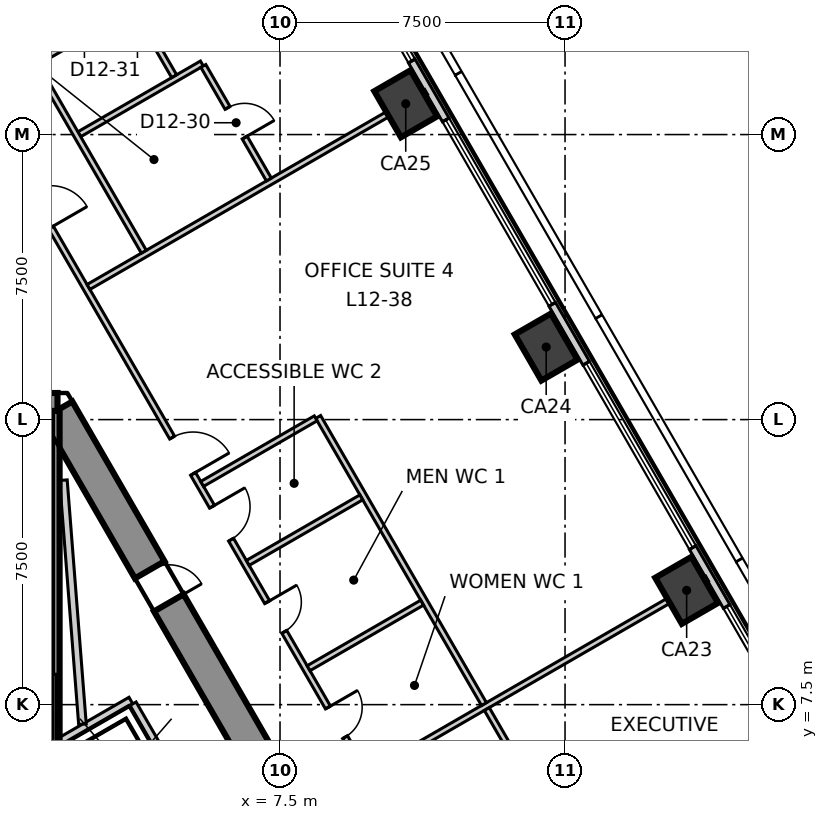
"""IFC4 building model, lengths in metres.
Left out: names, types, materials, properties, quantities, classifications, styles, units other than length and angle.
Written with IfcOpenShell. Run it as: python <this file> out.ifc"""

import sys

from ifc_helpers import new_model, si_unit, direction, frame, frame_2d, origin, origin_2d, place, context, subcontext, project, spatial, polyline, rectangle, outline, extrude, element, fill, save


model = new_model("IFC4")
c1 = context("Model", 3, precision=1e-05, world=origin(), true_north=direction((0.0, 1.0)))
c2 = subcontext(c1, "Body", "Model", "MODEL_VIEW")
j1 = project(units=[si_unit("LENGTHUNIT", "METRE"), si_unit("PLANEANGLEUNIT", "RADIAN")], contexts=[c1])
p1 = place(None, origin())
s1 = spatial("IfcSite", under=j1, at=p1, CompositionType="ELEMENT")
p2 = place(p1, origin())
s2 = spatial("IfcBuilding", under=s1, at=p2, CompositionType="ELEMENT")
p3 = place(p2, frame((0.0, 0.0, 59.3)))
s3 = spatial("IfcBuildingStorey", under=s2, at=p3, CompositionType="ELEMENT", Elevation=59.3)
p4 = place(p3, frame((1.645, 15.25, -0.3), z_axis=(0.0, 0.0, 1.0), x_axis=(-1.0, 0.0, 0.0)))
e1 = element("IfcWall", 1, at=p4, inside=s3, PredefinedType="SHEAR", context=c2, shape_type="SweptSolid", body=[
    extrude(outline(polyline([(-0.26, -0.45), (1.645, -0.45), (3.55, -0.45), (3.031, 0.45), (1.645, 0.45), (0.259, 0.45), (-0.26, -0.45)])), origin(), (0.0, 0.0, 1.0), 4.0),
])
p5 = place(p4, frame((0.945, 0.0, 0.3)))
e2 = element("IfcOpeningElement", 2, at=p5, cuts=e1, PredefinedType="OPENING", context=c2, shape_type="SweptSolid", body=[
    extrude(rectangle(XDim=1.4, YDim=2.1, at=frame_2d((0.7, 1.05))), frame((0.0, 0.46, 0.0), z_axis=(0.0, -1.0, 0.0), x_axis=(1.0, 0.0, 0.0)), (0.0, 0.0, 1.0), 0.92),
])
p6 = place(p3, frame((14.03, -6.2, -0.3), z_axis=(0.0, 0.0, 1.0), x_axis=(-0.500026485275, 0.866010111964, 0.0)))
e3 = element("IfcWall", 3, at=p6, inside=s3, PredefinedType="SHEAR", context=c2, shape_type="SweptSolid", body=[
    extrude(outline(polyline([(-0.26, -0.449), (1.685, -0.449), (3.63, -0.449), (5.576, -0.449), (7.521, -0.449), (9.466, -0.449), (11.411, -0.449), (13.357, -0.449), (15.302, -0.449), (17.247, -0.45), (19.192, -0.45), (21.138, -0.45), (23.083, -0.45), (25.028, -0.45), (24.509, 0.449), (22.644, 0.449), (20.778, 0.449), (18.913, 0.449), (17.048, 0.449), (15.182, 0.449), (13.317, 0.449), (11.452, 0.449), (9.587, 0.449), (7.721, 0.45), (5.856, 0.45), (3.991, 0.45), (2.125, 0.45), (0.26, 0.45), (-0.26, -0.449)])), origin(), (0.0, 0.0, 1.0), 4.0),
])
p7 = place(p6, frame((11.484, 0.0, 0.3)))
e4 = element("IfcOpeningElement", 4, at=p7, cuts=e3, PredefinedType="OPENING", context=c2, shape_type="SweptSolid", body=[
    extrude(rectangle(XDim=1.8, YDim=2.1, at=frame_2d((0.9, 1.05))), frame((0.0, 0.46, 0.0), z_axis=(0.0, -1.0, 0.0), x_axis=(1.0, 0.0, 0.0)), (0.0, 0.0, 1.0), 0.92),
])
p8 = place(p6, frame((18.914, 0.0, 0.3)))
e5 = element("IfcOpeningElement", 5, at=p8, cuts=e3, PredefinedType="OPENING", context=c2, shape_type="SweptSolid", body=[
    extrude(rectangle(XDim=1.0, YDim=2.1, at=frame_2d((0.5, 1.05))), frame((0.0, 0.46, 0.0), z_axis=(0.0, -1.0, 0.0), x_axis=(1.0, 0.0, 0.0)), (0.0, 0.0, 1.0), 0.92),
])
for number, where, z_axis, x_axis in (
    (6, (18.2, 10.507, -0.3), (0.0, 0.0, 1.0), (-0.5, 0.866, 0.0)),
    (7, (14.504, 16.909, -0.3), (0.0, 0.0, 1.0), (-0.5, 0.866, 0.0)),
    (8, (10.808, 23.31, -0.3), (0.0, 0.0, 1.0), (-0.5, 0.866, 0.0)),
):
    element("IfcColumn", number, at=place(p3, frame(where, z_axis=z_axis, x_axis=x_axis)), inside=s3, PredefinedType="COLUMN", context=c2, shape_type="SweptSolid", body=[
        extrude(rectangle(XDim=1.4, YDim=1.1, at=origin_2d()), origin(), (0.0, 0.0, 1.0), 4.0),
    ])
p9 = place(p3, frame((34.241, -15.876, 0.0), z_axis=(0.0, 0.0, 1.0), x_axis=(-0.500006313899, 0.866021758423, 0.0)))
e9 = element("IfcWall", 9, at=p9, inside=s3, PredefinedType="ELEMENTEDWALL", context=c2, shape_type="SweptSolid", body=[
    extrude(rectangle(XDim=61.719, YDim=0.2, at=frame_2d((30.859, 0.0))), origin(), (0.0, 0.0, 1.0), 3.7),
])
p10 = place(p9, frame((2.199, 0.0, 0.9)))
e10 = element("IfcOpeningElement", 10, at=p10, cuts=e9, PredefinedType="OPENING", context=c2, shape_type="SweptSolid", body=[
    extrude(rectangle(XDim=5.6, YDim=2.5, at=frame_2d((2.8, 1.25))), frame((0.0, 0.11, 0.0), z_axis=(0.0, -1.0, 0.0), x_axis=(1.0, 0.0, 0.0)), (0.0, 0.0, 1.0), 0.22),
])
p11 = place(p9, frame((9.59, 0.0, 0.9)))
e11 = element("IfcOpeningElement", 11, at=p11, cuts=e9, PredefinedType="OPENING", context=c2, shape_type="SweptSolid", body=[
    extrude(rectangle(XDim=5.6, YDim=2.5, at=frame_2d((2.8, 1.25))), frame((0.0, 0.11, 0.0), z_axis=(0.0, -1.0, 0.0), x_axis=(1.0, 0.0, 0.0)), (0.0, 0.0, 1.0), 0.22),
])
p12 = place(p9, frame((16.982, 0.0, 0.9)))
e12 = element("IfcOpeningElement", 12, at=p12, cuts=e9, PredefinedType="OPENING", context=c2, shape_type="SweptSolid", body=[
    extrude(rectangle(XDim=5.6, YDim=2.5, at=frame_2d((2.8, 1.25))), frame((0.0, 0.11, 0.0), z_axis=(0.0, -1.0, 0.0), x_axis=(1.0, 0.0, 0.0)), (0.0, 0.0, 1.0), 0.22),
])
p13 = place(p9, frame((24.374, 0.0, 0.9)))
e13 = element("IfcOpeningElement", 13, at=p13, cuts=e9, PredefinedType="OPENING", context=c2, shape_type="SweptSolid", body=[
    extrude(rectangle(XDim=5.6, YDim=2.5, at=frame_2d((2.8, 1.25))), frame((0.0, 0.11, 0.0), z_axis=(0.0, -1.0, 0.0), x_axis=(1.0, 0.0, 0.0)), (0.0, 0.0, 1.0), 0.22),
])
p14 = place(p9, frame((31.765, 0.0, 0.9)))
e14 = element("IfcOpeningElement", 14, at=p14, cuts=e9, PredefinedType="OPENING", context=c2, shape_type="SweptSolid", body=[
    extrude(rectangle(XDim=5.6, YDim=2.5, at=frame_2d((2.8, 1.25))), frame((0.0, 0.11, 0.0), z_axis=(0.0, -1.0, 0.0), x_axis=(1.0, 0.0, 0.0)), (0.0, 0.0, 1.0), 0.22),
])
p15 = place(p9, frame((39.157, 0.0, 0.9)))
e15 = element("IfcOpeningElement", 15, at=p15, cuts=e9, PredefinedType="OPENING", context=c2, shape_type="SweptSolid", body=[
    extrude(rectangle(XDim=5.6, YDim=2.5, at=frame_2d((2.8, 1.25))), frame((0.0, 0.11, 0.0), z_axis=(0.0, -1.0, 0.0), x_axis=(1.0, 0.0, 0.0)), (0.0, 0.0, 1.0), 0.22),
])
p16 = place(p9, frame((46.549, 0.0, 0.9)))
e16 = element("IfcOpeningElement", 16, at=p16, cuts=e9, PredefinedType="OPENING", context=c2, shape_type="SweptSolid", body=[
    extrude(rectangle(XDim=5.6, YDim=2.5, at=frame_2d((2.8, 1.25))), frame((0.0, 0.11, 0.0), z_axis=(0.0, -1.0, 0.0), x_axis=(1.0, 0.0, 0.0)), (0.0, 0.0, 1.0), 0.22),
])
p17 = place(p9, frame((53.94, 0.0, 0.9)))
e17 = element("IfcOpeningElement", 17, at=p17, cuts=e9, PredefinedType="OPENING", context=c2, shape_type="SweptSolid", body=[
    extrude(rectangle(XDim=5.6, YDim=2.5, at=frame_2d((2.8, 1.25))), frame((0.0, 0.11, 0.0), z_axis=(0.0, -1.0, 0.0), x_axis=(1.0, 0.0, 0.0)), (0.0, 0.0, 1.0), 0.22),
])
p18 = place(p3, frame((9.851, 5.687, 0.0), z_axis=(0.0, 0.0, 1.0), x_axis=(0.865968814955, 0.500098001921, 0.0)))
e18 = element("IfcWall", 18, at=p18, inside=s3, PredefinedType="PARTITIONING", context=c2, shape_type="SweptSolid", body=[
    extrude(rectangle(XDim=10.26, YDim=0.15, at=frame_2d((5.13, 0.0))), origin(), (0.0, 0.0, 1.0), 3.2),
])
p19 = place(p3, frame((0.075, 22.47, 0.0), z_axis=(0.0, 0.0, 1.0), x_axis=(0.500002280369, -0.866024087209, 0.0)))
e19 = element("IfcWall", 19, at=p19, inside=s3, PredefinedType="PARTITIONING", context=c2, shape_type="SweptSolid", body=[
    extrude(rectangle(XDim=38.844, YDim=0.15, at=frame_2d((19.422, 0.0))), origin(), (0.0, 0.0, 1.0), 3.7),
])
p20 = place(p19, frame((36.044, 0.0, 0.0)))
e20 = element("IfcOpeningElement", 20, at=p20, cuts=e19, PredefinedType="OPENING", context=c2, shape_type="SweptSolid", body=[
    extrude(rectangle(XDim=1.1, YDim=2.1, at=frame_2d((0.55, 1.05))), frame((0.0, 0.085, 0.0), z_axis=(0.0, -1.0, 0.0), x_axis=(1.0, 0.0, 0.0)), (0.0, 0.0, 1.0), 0.17),
])
p21 = place(p19, frame((26.255, 0.0, 0.0)))
e21 = element("IfcOpeningElement", 21, at=p21, cuts=e19, PredefinedType="OPENING", context=c2, shape_type="SweptSolid", body=[
    extrude(rectangle(XDim=1.1, YDim=2.1, at=frame_2d((0.55, 1.05))), frame((0.0, 0.085, 0.0), z_axis=(0.0, -1.0, 0.0), x_axis=(1.0, 0.0, 0.0)), (0.0, 0.0, 1.0), 0.17),
])
p22 = place(p19, frame((9.173, 0.0, 0.0)))
e22 = element("IfcOpeningElement", 22, at=p22, cuts=e19, PredefinedType="OPENING", context=c2, shape_type="SweptSolid", body=[
    extrude(rectangle(XDim=1.1, YDim=2.1, at=frame_2d((0.55, 1.05))), frame((0.0, 0.085, 0.0), z_axis=(0.0, -1.0, 0.0), x_axis=(1.0, 0.0, 0.0)), (0.0, 0.0, 1.0), 0.17),
])
p23 = place(p19, frame((17.373, 0.0, 0.0)))
e23 = element("IfcOpeningElement", 23, at=p23, cuts=e19, PredefinedType="OPENING", context=c2, shape_type="SweptSolid", body=[
    extrude(rectangle(XDim=0.9, YDim=2.1, at=frame_2d((0.45, 1.05))), frame((0.0, 0.085, 0.0), z_axis=(0.0, -1.0, 0.0), x_axis=(1.0, 0.0, 0.0)), (0.0, 0.0, 1.0), 0.17),
])
p24 = place(p19, frame((14.173, 0.0, 0.0)))
e24 = element("IfcOpeningElement", 24, at=p24, cuts=e19, PredefinedType="OPENING", context=c2, shape_type="SweptSolid", body=[
    extrude(rectangle(XDim=0.9, YDim=2.1, at=frame_2d((0.45, 1.05))), frame((0.0, 0.085, 0.0), z_axis=(0.0, -1.0, 0.0), x_axis=(1.0, 0.0, 0.0)), (0.0, 0.0, 1.0), 0.17),
])
p25 = place(p19, frame((11.273, 0.0, 0.0)))
e25 = element("IfcOpeningElement", 25, at=p25, cuts=e19, PredefinedType="OPENING", context=c2, shape_type="SweptSolid", body=[
    extrude(rectangle(XDim=1.0, YDim=2.1, at=frame_2d((0.5, 1.05))), frame((0.0, 0.085, 0.0), z_axis=(0.0, -1.0, 0.0), x_axis=(1.0, 0.0, 0.0)), (0.0, 0.0, 1.0), 0.17),
])
p26 = place(p19, frame((1.689, 0.0, 0.0)))
e26 = element("IfcOpeningElement", 26, at=p26, cuts=e19, PredefinedType="OPENING", context=c2, shape_type="SweptSolid", body=[
    extrude(rectangle(XDim=1.1, YDim=2.1, at=frame_2d((0.55, 1.05))), frame((0.0, 0.085, 0.0), z_axis=(0.0, -1.0, 0.0), x_axis=(1.0, 0.0, 0.0)), (0.0, 0.0, 1.0), 0.17),
])
p27 = place(p3, frame((2.46, 18.49, 0.0), z_axis=(0.0, 0.0, 1.0), x_axis=(0.866010033384, 0.500026621369, 0.0)))
e27 = element("IfcWall", 27, at=p27, inside=s3, PredefinedType="PARTITIONING", context=c2, shape_type="SweptSolid", body=[
    extrude(rectangle(XDim=10.26, YDim=0.15, at=frame_2d((5.13, 0.0))), origin(), (0.0, 0.0, 1.0), 3.7),
])
p28 = place(p3, frame((8.504, 15.07, 0.0), z_axis=(0.0, 0.0, 1.0), x_axis=(0.500042162787, -0.86600105972, 0.0)))
e28 = element("IfcWall", 28, at=p28, inside=s3, PredefinedType="PARTITIONING", context=c2, shape_type="SweptSolid", body=[
    extrude(rectangle(XDim=8.725, YDim=0.15, at=frame_2d((4.363, 0.0))), origin(), (0.0, 0.0, 1.0), 3.7),
])
for number, where, z_axis, x_axis in (
    (29, (5.451, 13.308, 0.0), (0.0, 0.0, 1.0), (0.866, 0.5, 0.0)),
    (30, (6.651, 11.229, 0.0), (0.0, 0.0, 1.0), (0.866, 0.5, 0.0)),
    (31, (8.251, 8.458, 0.0), (0.0, 0.0, 1.0), (0.866, 0.5, 0.0)),
):
    element("IfcWall", number, at=place(p3, frame(where, z_axis=z_axis, x_axis=x_axis)), inside=s3, PredefinedType="PARTITIONING", context=c2, shape_type="SweptSolid", body=[
        extrude(rectangle(XDim=3.45, YDim=0.15, at=frame_2d((1.725, 0.0))), origin(), (0.0, 0.0, 1.0), 3.7),
    ])
p29 = place(p3, frame((2.218, 22.508, 0.0), z_axis=(0.0, 0.0, 1.0), x_axis=(0.866085180849, 0.499896448792, 0.0)))
e32 = element("IfcWall", 32, at=p29, inside=s3, PredefinedType="PARTITIONING", context=c2, shape_type="SweptSolid", body=[
    extrude(rectangle(XDim=3.725, YDim=0.15, at=frame_2d((1.862, 0.0))), origin(), (0.0, 0.0, 1.0), 3.7),
])
p30 = place(p3, frame((3.651, 25.875, 0.0), z_axis=(0.0, 0.0, 1.0), x_axis=(0.500302479123, -0.865850696935, 0.0)))
e33 = element("IfcWall", 33, at=p30, inside=s3, PredefinedType="PARTITIONING", context=c2, shape_type="SweptSolid", body=[
    extrude(rectangle(XDim=2.125, YDim=0.15, at=frame_2d((1.062, 0.0))), origin(), (0.0, 0.0, 1.0), 3.7),
])
p31 = place(p3, frame((1.053, 24.375, 0.0), z_axis=(0.0, 0.0, 1.0), x_axis=(0.866036909293, 0.499980071345, 0.0)))
e34 = element("IfcWall", 34, at=p31, inside=s3, PredefinedType="PARTITIONING", context=c2, shape_type="SweptSolid", body=[
    extrude(rectangle(XDim=2.926, YDim=0.15, at=frame_2d((1.463, 0.0))), origin(), (0.0, 0.0, 1.0), 3.7),
])
p32 = place(p31, frame((1.051, 0.0, 0.0)))
e35 = element("IfcOpeningElement", 35, at=p32, cuts=e34, PredefinedType="OPENING", context=c2, shape_type="SweptSolid", body=[
    extrude(rectangle(XDim=0.9, YDim=2.1, at=frame_2d((0.45, 1.05))), frame((0.0, 0.085, 0.0), z_axis=(0.0, -1.0, 0.0), x_axis=(1.0, 0.0, 0.0)), (0.0, 0.0, 1.0), 0.17),
])
p33 = place(p3, frame((1.091, 24.31, 0.0), z_axis=(0.0, 0.0, 1.0), x_axis=(0.499991765245, -0.86603015807, 0.0)))
e36 = element("IfcWall", 36, at=p33, inside=s3, PredefinedType="PARTITIONING", context=c2, shape_type="SweptSolid", body=[
    extrude(rectangle(XDim=5.65, YDim=0.15, at=frame_2d((2.825, 0.0))), origin(), (0.0, 0.0, 1.0), 3.7),
])
p34 = place(p3, frame((5.482, 24.305, 0.0), z_axis=(0.0, 0.0, 1.0), x_axis=(0.49998991961, -0.866031223622, 0.0)))
e37 = element("IfcWall", 37, at=p34, inside=s3, PredefinedType="PARTITIONING", context=c2, shape_type="SweptSolid", body=[
    extrude(rectangle(XDim=3.45, YDim=0.15, at=frame_2d((1.725, 0.0))), origin(), (0.0, 0.0, 1.0), 3.7),
])
p35 = place(p34, frame((1.275, 0.0, 0.0)))
e38 = element("IfcOpeningElement", 38, at=p35, cuts=e37, PredefinedType="OPENING", context=c2, shape_type="SweptSolid", body=[
    extrude(rectangle(XDim=0.9, YDim=2.1, at=frame_2d((0.45, 1.05))), frame((0.0, 0.085, 0.0), z_axis=(0.0, -1.0, 0.0), x_axis=(1.0, 0.0, 0.0)), (0.0, 0.0, 1.0), 0.17),
])
p36 = place(p3, frame((12.942, 7.384, 0.0), z_axis=(0.0, 0.0, 1.0), x_axis=(0.499995423472, -0.866028046028, 0.0)))
e39 = element("IfcWall", 39, at=p36, inside=s3, PredefinedType="PARTITIONING", context=c2, shape_type="SweptSolid", body=[
    extrude(rectangle(XDim=14.633, YDim=0.15, at=frame_2d((7.316, 0.0))), origin(), (0.0, 0.0, 1.0), 3.7),
])
p37 = place(p36, frame((6.857, 0.0, 0.0)))
e40 = element("IfcOpeningElement", 40, at=p37, cuts=e39, PredefinedType="OPENING", context=c2, shape_type="SweptSolid", body=[
    extrude(rectangle(XDim=1.0, YDim=2.1, at=frame_2d((0.5, 1.05))), frame((0.0, 0.085, 0.0), z_axis=(0.0, -1.0, 0.0), x_axis=(1.0, 0.0, 0.0)), (0.0, 0.0, 1.0), 0.17),
])
p38 = place(p3, frame((-0.002, 5.541, 0.0), z_axis=(0.0, 0.0, 1.0), x_axis=(0.86600155993, 0.500041296494, 0.0)))
e41 = element("IfcWall", 41, at=p38, inside=s3, PredefinedType="SOLIDWALL", context=c2, shape_type="SweptSolid", body=[
    extrude(rectangle(XDim=4.132, YDim=0.2, at=frame_2d((2.066, 0.0))), origin(), (0.0, 0.0, 1.0), 3.7),
])
p39 = place(p3, frame((3.626, 7.52, 0.0), z_axis=(0.0, 0.0, 1.0), x_axis=(0.500060147554, -0.865990674793, 0.0)))
e42 = element("IfcWall", 42, at=p39, inside=s3, PredefinedType="SOLIDWALL", context=c2, shape_type="SweptSolid", body=[
    extrude(rectangle(XDim=2.9, YDim=0.2, at=frame_2d((1.45, 0.0))), origin(), (0.0, 0.0, 1.0), 3.7),
])
p40 = place(p3, frame((1.8, 13.406, 0.0), z_axis=(0.0, 0.0, 1.0), x_axis=(0.077809933421, -0.996968211259, 0.0)))
e43 = element("IfcWall", 43, at=p40, inside=s3, PredefinedType="SOLIDWALL", context=c2, shape_type="SweptSolid", body=[
    extrude(rectangle(XDim=6.438, YDim=0.2, at=frame_2d((3.219, 0.0))), origin(), (0.0, 0.0, 1.0), 3.7),
])
p41 = place(p3, frame((1.6, 6.615, 0.0), z_axis=(0.0, 0.0, 1.0), x_axis=(0.0, 1.0, 0.0)))
e44 = element("IfcWall", 44, at=p41, inside=s3, PredefinedType="SOLIDWALL", context=c2, shape_type="SweptSolid", body=[
    extrude(rectangle(XDim=8.615, YDim=0.2, at=frame_2d((4.308, 0.0))), origin(), (0.0, 0.0, 1.0), 3.7),
])
p42 = place(p13, origin())
e45 = element("IfcWindow", 45, at=p42, inside=s3, PartitioningType="SINGLE_PANEL", PredefinedType="WINDOW", context=c2, shape_type="SweptSolid", body=[
    extrude(rectangle(XDim=5.6, YDim=2.5, at=frame_2d((2.8, 1.25))), frame((0.0, 0.03, 0.0), z_axis=(0.0, -1.0, 0.0), x_axis=(1.0, 0.0, 0.0)), (0.0, 0.0, 1.0), 0.06),
])
fill(e13, e45)
p43 = place(p14, origin())
e46 = element("IfcWindow", 46, at=p43, inside=s3, PartitioningType="SINGLE_PANEL", PredefinedType="WINDOW", context=c2, shape_type="SweptSolid", body=[
    extrude(rectangle(XDim=5.6, YDim=2.5, at=frame_2d((2.8, 1.25))), frame((0.0, 0.03, 0.0), z_axis=(0.0, -1.0, 0.0), x_axis=(1.0, 0.0, 0.0)), (0.0, 0.0, 1.0), 0.06),
])
fill(e14, e46)
p44 = place(p15, origin())
e47 = element("IfcWindow", 47, at=p44, inside=s3, PartitioningType="SINGLE_PANEL", PredefinedType="WINDOW", context=c2, shape_type="SweptSolid", body=[
    extrude(rectangle(XDim=5.6, YDim=2.5, at=frame_2d((2.8, 1.25))), frame((0.0, 0.03, 0.0), z_axis=(0.0, -1.0, 0.0), x_axis=(1.0, 0.0, 0.0)), (0.0, 0.0, 1.0), 0.06),
])
fill(e15, e47)
p45 = place(p16, origin())
e48 = element("IfcWindow", 48, at=p45, inside=s3, PartitioningType="SINGLE_PANEL", PredefinedType="WINDOW", context=c2, shape_type="SweptSolid", body=[
    extrude(rectangle(XDim=5.6, YDim=2.5, at=frame_2d((2.8, 1.25))), frame((0.0, 0.03, 0.0), z_axis=(0.0, -1.0, 0.0), x_axis=(1.0, 0.0, 0.0)), (0.0, 0.0, 1.0), 0.06),
])
fill(e16, e48)
p46 = place(p22, origin())
e49 = element("IfcDoor", 49, at=p46, inside=s3, OperationType="SINGLE_SWING_LEFT", PredefinedType="DOOR", context=c2, shape_type="SweptSolid", body=[
    extrude(rectangle(XDim=1.1, YDim=2.1, at=frame_2d((0.55, 1.05))), frame((0.0, 0.025, 0.0), z_axis=(0.0, -1.0, 0.0), x_axis=(1.0, 0.0, 0.0)), (0.0, 0.0, 1.0), 0.05),
])
fill(e22, e49)
p47 = place(p23, origin())
e50 = element("IfcDoor", 50, at=p47, inside=s3, OperationType="SINGLE_SWING_RIGHT", PredefinedType="DOOR", context=c2, shape_type="SweptSolid", body=[
    extrude(rectangle(XDim=0.9, YDim=2.1, at=frame_2d((0.45, 1.05))), frame((0.0, 0.025, 0.0), z_axis=(0.0, -1.0, 0.0), x_axis=(1.0, 0.0, 0.0)), (0.0, 0.0, 1.0), 0.05),
])
fill(e23, e50)
p48 = place(p24, origin())
e51 = element("IfcDoor", 51, at=p48, inside=s3, OperationType="SINGLE_SWING_RIGHT", PredefinedType="DOOR", context=c2, shape_type="SweptSolid", body=[
    extrude(rectangle(XDim=0.9, YDim=2.1, at=frame_2d((0.45, 1.05))), frame((0.0, 0.025, 0.0), z_axis=(0.0, -1.0, 0.0), x_axis=(1.0, 0.0, 0.0)), (0.0, 0.0, 1.0), 0.05),
])
fill(e24, e51)
p49 = place(p25, origin())
e52 = element("IfcDoor", 52, at=p49, inside=s3, OperationType="SINGLE_SWING_RIGHT", PredefinedType="DOOR", context=c2, shape_type="SweptSolid", body=[
    extrude(rectangle(XDim=1.0, YDim=2.1, at=frame_2d((0.5, 1.05))), frame((0.0, 0.025, 0.0), z_axis=(0.0, -1.0, 0.0), x_axis=(1.0, 0.0, 0.0)), (0.0, 0.0, 1.0), 0.05),
])
fill(e25, e52)
p50 = place(p35, origin())
e53 = element("IfcDoor", 53, at=p50, inside=s3, OperationType="SINGLE_SWING_LEFT", PredefinedType="DOOR", context=c2, shape_type="SweptSolid", body=[
    extrude(rectangle(XDim=0.9, YDim=2.1, at=frame_2d((0.45, 1.05))), frame((0.0, 0.025, 0.0), z_axis=(0.0, -1.0, 0.0), x_axis=(1.0, 0.0, 0.0)), (0.0, 0.0, 1.0), 0.05),
])
fill(e38, e53)
p51 = place(p8, origin())
e54 = element("IfcDoor", 54, at=p51, inside=s3, OperationType="SINGLE_SWING_LEFT", PredefinedType="DOOR", context=c2, shape_type="SweptSolid", body=[
    extrude(rectangle(XDim=1.0, YDim=2.1, at=frame_2d((0.5, 1.05))), frame((0.0, 0.025, 0.0), z_axis=(0.0, -1.0, 0.0), x_axis=(1.0, 0.0, 0.0)), (0.0, 0.0, 1.0), 0.05),
])
fill(e5, e54)
save(model, sys.argv[1])
